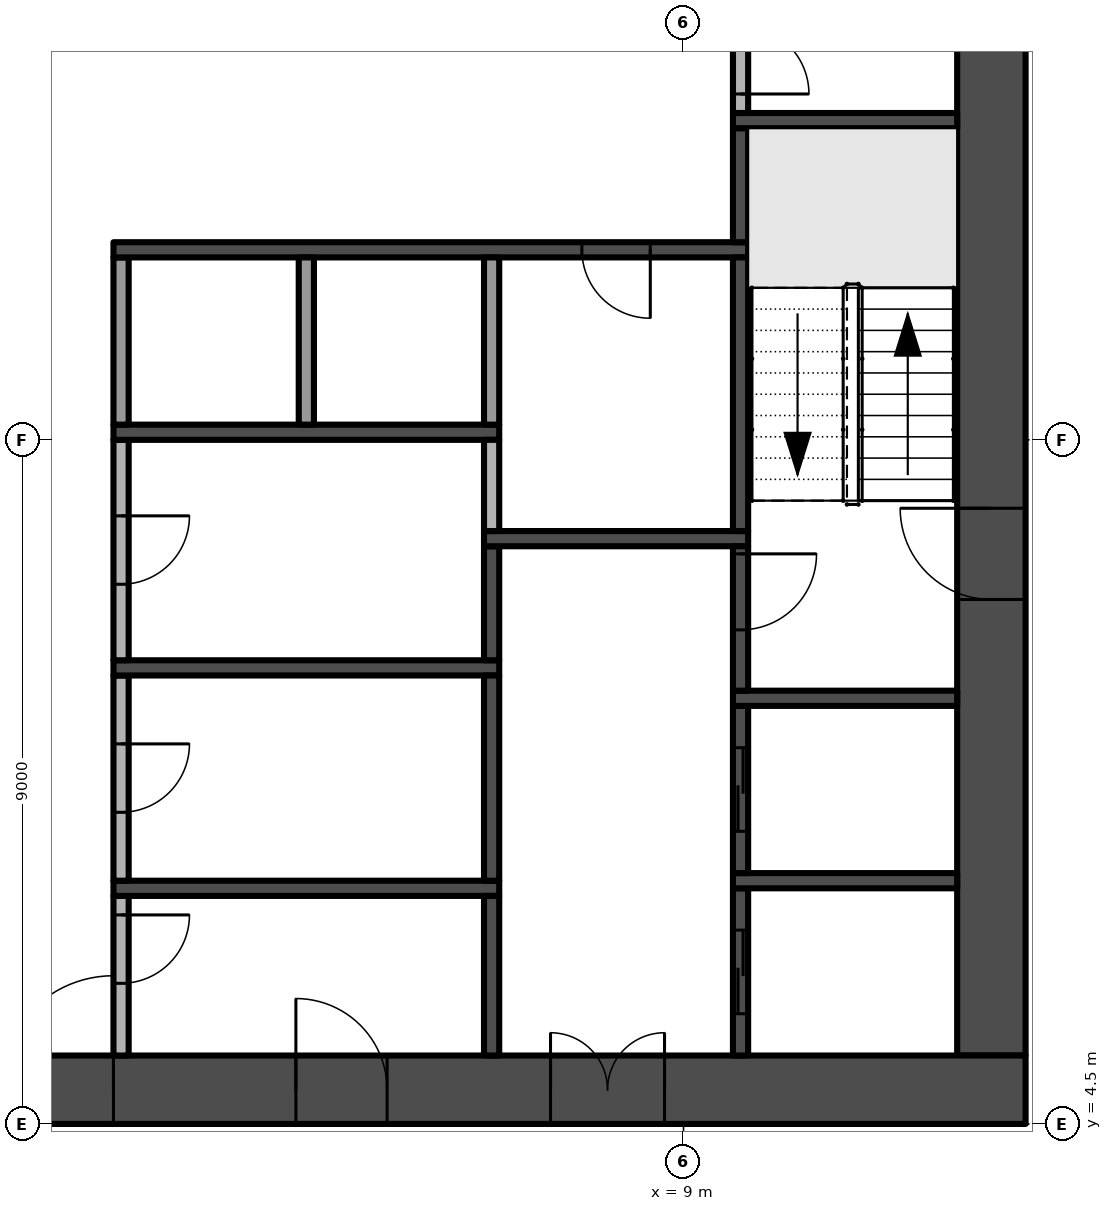
"""IFC4 building model, lengths in metres.
Left out: names, types, materials, properties, quantities, classifications, styles, units other than length and angle.
Written with IfcOpenShell. Run it as: python <this file> out.ifc"""

import sys

from ifc_helpers import new_model, si_unit, direction, frame, frame_2d, origin, place, context, subcontext, project, spatial, rectangle, extrude, element, fill, save


model = new_model("IFC4")
c1 = context("Model", 3, precision=1e-05, world=origin(), true_north=direction((0.0, 1.0)))
c2 = subcontext(c1, "Body", "Model", "MODEL_VIEW")
j1 = project(units=[si_unit("LENGTHUNIT", "METRE"), si_unit("PLANEANGLEUNIT", "RADIAN")], contexts=[c1])
p1 = place(None, origin())
s1 = spatial("IfcSite", under=j1, at=p1, CompositionType="ELEMENT")
p2 = place(p1, origin())
s2 = spatial("IfcBuilding", under=s1, at=p2, CompositionType="ELEMENT")
p3 = place(p2, frame((0.0, 0.0, 45.4)))
s3 = spatial("IfcBuildingStorey", under=s2, at=p3, CompositionType="ELEMENT", Elevation=45.4)
p4 = place(p3, frame((-13.5, 4.95, -0.3), z_axis=(0.0, 0.0, 1.0), x_axis=(1.0, 0.0, 0.0)))
e1 = element("IfcWall", 1, at=p4, inside=s3, PredefinedType="SHEAR", context=c2, shape_type="SweptSolid", body=[
    extrude(rectangle(XDim=27.0, YDim=0.9, at=frame_2d((13.5, 0.0))), origin(), (0.0, 0.0, 1.0), 3.8),
])
p5 = place(p4, frame((12.0, 0.0, 0.3)))
e2 = element("IfcOpeningElement", 2, at=p5, cuts=e1, PredefinedType="OPENING", context=c2, shape_type="SweptSolid", body=[
    extrude(rectangle(XDim=3.0, YDim=2.4, at=frame_2d((1.5, 1.2))), frame((0.0, 0.46, 0.0), z_axis=(0.0, -1.0, 0.0), x_axis=(1.0, 0.0, 0.0)), (0.0, 0.0, 1.0), 0.92),
])
p6 = place(p4, frame((4.9, 0.0, 0.3)))
e3 = element("IfcOpeningElement", 3, at=p6, cuts=e1, PredefinedType="OPENING", context=c2, shape_type="SweptSolid", body=[
    extrude(rectangle(XDim=1.2, YDim=2.2, at=frame_2d((0.6, 1.1))), frame((0.0, 0.46, 0.0), z_axis=(0.0, -1.0, 0.0), x_axis=(1.0, 0.0, 0.0)), (0.0, 0.0, 1.0), 0.92),
])
p7 = place(p4, frame((20.75, 0.0, 0.3)))
e4 = element("IfcOpeningElement", 4, at=p7, cuts=e1, PredefinedType="OPENING", context=c2, shape_type="SweptSolid", body=[
    extrude(rectangle(XDim=1.5, YDim=2.2, at=frame_2d((0.75, 1.1))), frame((0.0, 0.46, 0.0), z_axis=(0.0, -1.0, 0.0), x_axis=(1.0, 0.0, 0.0)), (0.0, 0.0, 1.0), 0.92),
])
p8 = place(p4, frame((17.4, 0.0, 0.3)))
e5 = element("IfcOpeningElement", 5, at=p8, cuts=e1, PredefinedType="OPENING", context=c2, shape_type="SweptSolid", body=[
    extrude(rectangle(XDim=1.2, YDim=2.2, at=frame_2d((0.6, 1.1))), frame((0.0, 0.46, 0.0), z_axis=(0.0, -1.0, 0.0), x_axis=(1.0, 0.0, 0.0)), (0.0, 0.0, 1.0), 0.92),
])
p9 = place(p3, frame((13.05, 5.4, -0.3), z_axis=(0.0, 0.0, 1.0), x_axis=(0.0, 1.0, 0.0)))
e6 = element("IfcWall", 6, at=p9, inside=s3, PredefinedType="SHEAR", context=c2, shape_type="SweptSolid", body=[
    extrude(rectangle(XDim=16.2, YDim=0.9, at=frame_2d((8.1, 0.0))), origin(), (0.0, 0.0, 1.0), 3.8),
])
p10 = place(p9, frame((6.0, 0.0, 0.3)))
e7 = element("IfcOpeningElement", 7, at=p10, cuts=e6, PredefinedType="OPENING", context=c2, shape_type="SweptSolid", body=[
    extrude(rectangle(XDim=1.2, YDim=2.2, at=frame_2d((0.6, 1.1))), frame((0.0, 0.46, 0.0), z_axis=(0.0, -1.0, 0.0), x_axis=(1.0, 0.0, 0.0)), (0.0, 0.0, 1.0), 0.92),
])
p11 = place(p3, frame((1.6, 7.5, 0.0), z_axis=(0.0, 0.0, 1.0), x_axis=(0.0, -1.0, 0.0)))
e8 = element("IfcWall", 8, at=p11, inside=s3, PredefinedType="PARTITIONING", context=c2, shape_type="SweptSolid", body=[
    extrude(rectangle(XDim=2.1, YDim=0.2, at=frame_2d((1.05, 0.0))), origin(), (0.0, 0.0, 1.0), 3.5),
])
p12 = place(p11, frame((0.25, 0.0, 0.0)))
e9 = element("IfcOpeningElement", 9, at=p12, cuts=e8, PredefinedType="OPENING", context=c2, shape_type="SweptSolid", body=[
    extrude(rectangle(XDim=0.9, YDim=2.1, at=frame_2d((0.45, 1.05))), frame((0.0, 0.11, 0.0), z_axis=(0.0, -1.0, 0.0), x_axis=(1.0, 0.0, 0.0)), (0.0, 0.0, 1.0), 0.22),
])
p13 = place(p3, frame((1.5, 7.6, 0.0), z_axis=(0.0, 0.0, 1.0), x_axis=(1.0, 0.0, 0.0)))
e10 = element("IfcWall", 10, at=p13, inside=s3, PredefinedType="SHEAR", context=c2, shape_type="SweptSolid", body=[
    extrude(rectangle(XDim=5.075, YDim=0.2, at=frame_2d((2.538, 0.0))), origin(), (0.0, 0.0, 1.0), 3.5),
])
p14 = place(p3, frame((1.6, 10.4, 0.0), z_axis=(0.0, 0.0, 1.0), x_axis=(0.0, -1.0, 0.0)))
e11 = element("IfcWall", 11, at=p14, inside=s3, PredefinedType="PARTITIONING", context=c2, shape_type="SweptSolid", body=[
    extrude(rectangle(XDim=2.7, YDim=0.2, at=frame_2d((1.35, 0.0))), origin(), (0.0, 0.0, 1.0), 3.5),
])
p15 = place(p14, frame((0.9, 0.0, 0.0)))
e12 = element("IfcOpeningElement", 12, at=p15, cuts=e11, PredefinedType="OPENING", context=c2, shape_type="SweptSolid", body=[
    extrude(rectangle(XDim=0.9, YDim=2.1, at=frame_2d((0.45, 1.05))), frame((0.0, 0.11, 0.0), z_axis=(0.0, -1.0, 0.0), x_axis=(1.0, 0.0, 0.0)), (0.0, 0.0, 1.0), 0.22),
])
p16 = place(p3, frame((1.5, 10.5, 0.0), z_axis=(0.0, 0.0, 1.0), x_axis=(1.0, 0.0, 0.0)))
e13 = element("IfcWall", 13, at=p16, inside=s3, PredefinedType="SHEAR", context=c2, shape_type="SweptSolid", body=[
    extrude(rectangle(XDim=5.075, YDim=0.2, at=frame_2d((2.538, 0.0))), origin(), (0.0, 0.0, 1.0), 3.5),
])
p17 = place(p3, frame((1.6, 13.5, 0.0), z_axis=(0.0, 0.0, 1.0), x_axis=(0.0, -1.0, 0.0)))
e14 = element("IfcWall", 14, at=p17, inside=s3, PredefinedType="PARTITIONING", context=c2, shape_type="SweptSolid", body=[
    extrude(rectangle(XDim=2.9, YDim=0.2, at=frame_2d((1.45, 0.0))), origin(), (0.0, 0.0, 1.0), 3.5),
])
p18 = place(p17, frame((1.0, 0.0, 0.0)))
e15 = element("IfcOpeningElement", 15, at=p18, cuts=e14, PredefinedType="OPENING", context=c2, shape_type="SweptSolid", body=[
    extrude(rectangle(XDim=0.9, YDim=2.1, at=frame_2d((0.45, 1.05))), frame((0.0, 0.11, 0.0), z_axis=(0.0, -1.0, 0.0), x_axis=(1.0, 0.0, 0.0)), (0.0, 0.0, 1.0), 0.22),
])
p19 = place(p3, frame((1.5, 13.6, 0.0), z_axis=(0.0, 0.0, 1.0), x_axis=(1.0, 0.0, 0.0)))
e16 = element("IfcWall", 16, at=p19, inside=s3, PredefinedType="SHEAR", context=c2, shape_type="SweptSolid", body=[
    extrude(rectangle(XDim=5.075, YDim=0.2, at=frame_2d((2.538, 0.0))), origin(), (0.0, 0.0, 1.0), 3.5),
])
p20 = place(p3, frame((1.6, 13.7, 0.0), z_axis=(0.0, 0.0, 1.0), x_axis=(0.0, 1.0, 0.0)))
e17 = element("IfcWall", 17, at=p20, inside=s3, PredefinedType="PARTITIONING", context=c2, shape_type="SweptSolid", body=[
    extrude(rectangle(XDim=2.2, YDim=0.2, at=frame_2d((1.1, 0.0))), origin(), (0.0, 0.0, 1.0), 3.5),
])
p21 = place(p3, frame((9.85, 16.0, 0.0), z_axis=(0.0, 0.0, 1.0), x_axis=(-1.0, 0.0, 0.0)))
e18 = element("IfcWall", 18, at=p21, inside=s3, PredefinedType="SHEAR", context=c2, shape_type="SweptSolid", body=[
    extrude(rectangle(XDim=8.35, YDim=0.2, at=frame_2d((4.175, 0.0))), origin(), (0.0, 0.0, 1.0), 3.5),
])
p22 = place(p21, frame((1.288, 0.0, 0.0)))
e19 = element("IfcOpeningElement", 19, at=p22, cuts=e18, PredefinedType="OPENING", context=c2, shape_type="SweptSolid", body=[
    extrude(rectangle(XDim=0.9, YDim=2.1, at=frame_2d((0.45, 1.05))), frame((0.0, 0.11, 0.0), z_axis=(0.0, -1.0, 0.0), x_axis=(1.0, 0.0, 0.0)), (0.0, 0.0, 1.0), 0.22),
])
p23 = place(p3, frame((4.037, 13.7, 0.0), z_axis=(0.0, 0.0, 1.0), x_axis=(0.0, 1.0, 0.0)))
e20 = element("IfcWall", 20, at=p23, inside=s3, PredefinedType="PARTITIONING", context=c2, shape_type="SweptSolid", body=[
    extrude(rectangle(XDim=2.2, YDim=0.2, at=frame_2d((1.1, 0.0))), origin(), (0.0, 0.0, 1.0), 3.5),
])
p24 = place(p3, frame((6.475, 5.4, 0.0), z_axis=(0.0, 0.0, 1.0), x_axis=(0.0, 1.0, 0.0)))
e21 = element("IfcWall", 21, at=p24, inside=s3, PredefinedType="SHEAR", context=c2, shape_type="SweptSolid", body=[
    extrude(rectangle(XDim=2.1, YDim=0.2, at=frame_2d((1.05, 0.0))), origin(), (0.0, 0.0, 1.0), 3.5),
])
p25 = place(p3, frame((6.475, 7.7, 0.0), z_axis=(0.0, 0.0, 1.0), x_axis=(0.0, 1.0, 0.0)))
e22 = element("IfcWall", 22, at=p25, inside=s3, PredefinedType="SHEAR", context=c2, shape_type="SweptSolid", body=[
    extrude(rectangle(XDim=2.7, YDim=0.2, at=frame_2d((1.35, 0.0))), origin(), (0.0, 0.0, 1.0), 3.5),
])
p26 = place(p3, frame((6.475, 10.6, 0.0), z_axis=(0.0, 0.0, 1.0), x_axis=(0.0, 1.0, 0.0)))
e23 = element("IfcWall", 23, at=p26, inside=s3, PredefinedType="SHEAR", context=c2, shape_type="SweptSolid", body=[
    extrude(rectangle(XDim=1.5, YDim=0.2, at=frame_2d((0.75, 0.0))), origin(), (0.0, 0.0, 1.0), 3.5),
])
p27 = place(p3, frame((6.375, 12.2, 0.0), z_axis=(0.0, 0.0, 1.0), x_axis=(1.0, 0.0, 0.0)))
e24 = element("IfcWall", 24, at=p27, inside=s3, PredefinedType="SHEAR", context=c2, shape_type="SweptSolid", body=[
    extrude(rectangle(XDim=3.475, YDim=0.2, at=frame_2d((1.738, 0.0))), origin(), (0.0, 0.0, 1.0), 3.5),
])
p28 = place(p3, frame((6.475, 12.3, 0.0), z_axis=(0.0, 0.0, 1.0), x_axis=(0.0, 1.0, 0.0)))
e25 = element("IfcWall", 25, at=p28, inside=s3, PredefinedType="PARTITIONING", context=c2, shape_type="SweptSolid", body=[
    extrude(rectangle(XDim=1.2, YDim=0.2, at=frame_2d((0.6, 0.0))), origin(), (0.0, 0.0, 1.0), 3.5),
])
p29 = place(p3, frame((6.475, 13.7, 0.0), z_axis=(0.0, 0.0, 1.0), x_axis=(0.0, 1.0, 0.0)))
e26 = element("IfcWall", 26, at=p29, inside=s3, PredefinedType="PARTITIONING", context=c2, shape_type="SweptSolid", body=[
    extrude(rectangle(XDim=2.2, YDim=0.2, at=frame_2d((1.1, 0.0))), origin(), (0.0, 0.0, 1.0), 3.5),
])
p30 = place(p3, frame((9.75, 5.4, 0.0), z_axis=(0.0, 0.0, 1.0), x_axis=(0.0, 1.0, 0.0)))
e27 = element("IfcWall", 27, at=p30, inside=s3, PredefinedType="SHEAR", context=c2, shape_type="SweptSolid", body=[
    extrude(rectangle(XDim=2.2, YDim=0.2, at=frame_2d((1.1, 0.0))), origin(), (0.0, 0.0, 1.0), 3.5),
])
p31 = place(p30, frame((0.55, 0.0, 0.0)))
e28 = element("IfcOpeningElement", 28, at=p31, cuts=e27, PredefinedType="OPENING", context=c2, shape_type="SweptSolid", body=[
    extrude(rectangle(XDim=1.1, YDim=2.1, at=frame_2d((0.55, 1.05))), frame((0.0, 0.11, 0.0), z_axis=(0.0, -1.0, 0.0), x_axis=(1.0, 0.0, 0.0)), (0.0, 0.0, 1.0), 0.22),
])
p32 = place(p3, frame((9.65, 7.7, 0.0), z_axis=(0.0, 0.0, 1.0), x_axis=(1.0, 0.0, 0.0)))
e29 = element("IfcWall", 29, at=p32, inside=s3, PredefinedType="SHEAR", context=c2, shape_type="SweptSolid", body=[
    extrude(rectangle(XDim=2.95, YDim=0.2, at=frame_2d((1.475, 0.0))), origin(), (0.0, 0.0, 1.0), 3.5),
])
p33 = place(p3, frame((9.75, 7.8, 0.0), z_axis=(0.0, 0.0, 1.0), x_axis=(0.0, 1.0, 0.0)))
e30 = element("IfcWall", 30, at=p33, inside=s3, PredefinedType="SHEAR", context=c2, shape_type="SweptSolid", body=[
    extrude(rectangle(XDim=2.2, YDim=0.2, at=frame_2d((1.1, 0.0))), origin(), (0.0, 0.0, 1.0), 3.5),
])
p34 = place(p33, frame((0.55, 0.0, 0.0)))
e31 = element("IfcOpeningElement", 31, at=p34, cuts=e30, PredefinedType="OPENING", context=c2, shape_type="SweptSolid", body=[
    extrude(rectangle(XDim=1.1, YDim=2.1, at=frame_2d((0.55, 1.05))), frame((0.0, 0.11, 0.0), z_axis=(0.0, -1.0, 0.0), x_axis=(1.0, 0.0, 0.0)), (0.0, 0.0, 1.0), 0.22),
])
p35 = place(p3, frame((9.65, 10.1, 0.0), z_axis=(0.0, 0.0, 1.0), x_axis=(1.0, 0.0, 0.0)))
e32 = element("IfcWall", 32, at=p35, inside=s3, PredefinedType="SHEAR", context=c2, shape_type="SweptSolid", body=[
    extrude(rectangle(XDim=2.95, YDim=0.2, at=frame_2d((1.475, 0.0))), origin(), (0.0, 0.0, 1.0), 3.5),
])
p36 = place(p3, frame((9.75, 12.1, 0.0), z_axis=(0.0, 0.0, 1.0), x_axis=(0.0, -1.0, 0.0)))
e33 = element("IfcWall", 33, at=p36, inside=s3, PredefinedType="SHEAR", context=c2, shape_type="SweptSolid", body=[
    extrude(rectangle(XDim=1.9, YDim=0.2, at=frame_2d((0.95, 0.0))), origin(), (0.0, 0.0, 1.0), 3.5),
])
p37 = place(p36, frame((0.1, 0.0, 0.0)))
e34 = element("IfcOpeningElement", 34, at=p37, cuts=e33, PredefinedType="OPENING", context=c2, shape_type="SweptSolid", body=[
    extrude(rectangle(XDim=1.0, YDim=2.2, at=frame_2d((0.5, 1.1))), frame((0.0, 0.11, 0.0), z_axis=(0.0, -1.0, 0.0), x_axis=(1.0, 0.0, 0.0)), (0.0, 0.0, 1.0), 0.22),
])
p38 = place(p3, frame((9.75, 12.3, 0.0), z_axis=(0.0, 0.0, 1.0), x_axis=(0.0, 1.0, 0.0)))
e35 = element("IfcWall", 35, at=p38, inside=s3, PredefinedType="SHEAR", context=c2, shape_type="SweptSolid", body=[
    extrude(rectangle(XDim=3.6, YDim=0.2, at=frame_2d((1.8, 0.0))), origin(), (0.0, 0.0, 1.0), 3.5),
])
p39 = place(p3, frame((9.75, 16.1, 0.0), z_axis=(0.0, 0.0, 1.0), x_axis=(0.0, 1.0, 0.0)))
e36 = element("IfcWall", 36, at=p39, inside=s3, PredefinedType="SHEAR", context=c2, shape_type="SweptSolid", body=[
    extrude(rectangle(XDim=1.5, YDim=0.2, at=frame_2d((0.75, 0.0))), origin(), (0.0, 0.0, 1.0), 3.5),
])
p40 = place(p3, frame((9.65, 17.7, 0.0), z_axis=(0.0, 0.0, 1.0), x_axis=(1.0, 0.0, 0.0)))
e37 = element("IfcWall", 37, at=p40, inside=s3, PredefinedType="SHEAR", context=c2, shape_type="SweptSolid", body=[
    extrude(rectangle(XDim=2.95, YDim=0.2, at=frame_2d((1.475, 0.0))), origin(), (0.0, 0.0, 1.0), 3.5),
])
p41 = place(p3, frame((9.75, 19.2, 0.0), z_axis=(0.0, 0.0, 1.0), x_axis=(0.0, -1.0, 0.0)))
e38 = element("IfcWall", 38, at=p41, inside=s3, PredefinedType="PARTITIONING", context=c2, shape_type="SweptSolid", body=[
    extrude(rectangle(XDim=1.4, YDim=0.2, at=frame_2d((0.7, 0.0))), origin(), (0.0, 0.0, 1.0), 3.5),
])
p42 = place(p41, frame((0.25, 0.0, 0.0)))
e39 = element("IfcOpeningElement", 39, at=p42, cuts=e38, PredefinedType="OPENING", context=c2, shape_type="SweptSolid", body=[
    extrude(rectangle(XDim=0.9, YDim=2.1, at=frame_2d((0.45, 1.05))), frame((0.0, 0.11, 0.0), z_axis=(0.0, -1.0, 0.0), x_axis=(1.0, 0.0, 0.0)), (0.0, 0.0, 1.0), 0.22),
])
p43 = place(p5, frame((3.0, 0.0, 0.0), z_axis=(0.0, 0.0, 1.0), x_axis=(-1.0, 0.0, 0.0)))
e40 = element("IfcDoor", 40, at=p43, inside=s3, OperationType="DOUBLE_DOOR_SINGLE_SWING", PredefinedType="DOOR", context=c2, shape_type="SweptSolid", body=[
    extrude(rectangle(XDim=3.0, YDim=2.4, at=frame_2d((1.5, 1.2))), frame((0.0, 0.025, 0.0), z_axis=(0.0, -1.0, 0.0), x_axis=(1.0, 0.0, 0.0)), (0.0, 0.0, 1.0), 0.05),
])
fill(e2, e40)
p44 = place(p10, frame((1.2, 0.0, 0.0), z_axis=(0.0, 0.0, 1.0), x_axis=(-1.0, 0.0, 0.0)))
e41 = element("IfcDoor", 41, at=p44, inside=s3, OperationType="SINGLE_SWING_LEFT", PredefinedType="DOOR", context=c2, shape_type="SweptSolid", body=[
    extrude(rectangle(XDim=1.2, YDim=2.2, at=frame_2d((0.6, 1.1))), frame((0.0, 0.025, 0.0), z_axis=(0.0, -1.0, 0.0), x_axis=(1.0, 0.0, 0.0)), (0.0, 0.0, 1.0), 0.05),
])
fill(e7, e41)
p45 = place(p7, frame((1.5, 0.0, 0.0), z_axis=(0.0, 0.0, 1.0), x_axis=(-1.0, 0.0, 0.0)))
e42 = element("IfcDoor", 42, at=p45, inside=s3, OperationType="DOUBLE_DOOR_SINGLE_SWING", PredefinedType="DOOR", context=c2, shape_type="SweptSolid", body=[
    extrude(rectangle(XDim=1.5, YDim=2.2, at=frame_2d((0.75, 1.1))), frame((0.0, 0.025, 0.0), z_axis=(0.0, -1.0, 0.0), x_axis=(1.0, 0.0, 0.0)), (0.0, 0.0, 1.0), 0.05),
])
fill(e4, e42)
p46 = place(p8, frame((1.2, 0.0, 0.0), z_axis=(0.0, 0.0, 1.0), x_axis=(-1.0, 0.0, 0.0)))
e43 = element("IfcDoor", 43, at=p46, inside=s3, OperationType="SINGLE_SWING_RIGHT", PredefinedType="DOOR", context=c2, shape_type="SweptSolid", body=[
    extrude(rectangle(XDim=1.2, YDim=2.2, at=frame_2d((0.6, 1.1))), frame((0.0, 0.025, 0.0), z_axis=(0.0, -1.0, 0.0), x_axis=(1.0, 0.0, 0.0)), (0.0, 0.0, 1.0), 0.05),
])
fill(e5, e43)
p47 = place(p37, origin())
e44 = element("IfcDoor", 44, at=p47, inside=s3, OperationType="SINGLE_SWING_LEFT", PredefinedType="DOOR", context=c2, shape_type="SweptSolid", body=[
    extrude(rectangle(XDim=1.0, YDim=2.2, at=frame_2d((0.5, 1.1))), frame((0.0, 0.025, 0.0), z_axis=(0.0, -1.0, 0.0), x_axis=(1.0, 0.0, 0.0)), (0.0, 0.0, 1.0), 0.05),
])
fill(e34, e44)
p48 = place(p31, origin())
e45 = element("IfcDoor", 45, at=p48, inside=s3, OperationType="SLIDING_TO_RIGHT", PredefinedType="DOOR", context=c2, shape_type="SweptSolid", body=[
    extrude(rectangle(XDim=1.1, YDim=2.1, at=frame_2d((0.55, 1.05))), frame((0.0, 0.025, 0.0), z_axis=(0.0, -1.0, 0.0), x_axis=(1.0, 0.0, 0.0)), (0.0, 0.0, 1.0), 0.05),
])
fill(e28, e45)
p49 = place(p34, origin())
e46 = element("IfcDoor", 46, at=p49, inside=s3, OperationType="SLIDING_TO_RIGHT", PredefinedType="DOOR", context=c2, shape_type="SweptSolid", body=[
    extrude(rectangle(XDim=1.1, YDim=2.1, at=frame_2d((0.55, 1.05))), frame((0.0, 0.025, 0.0), z_axis=(0.0, -1.0, 0.0), x_axis=(1.0, 0.0, 0.0)), (0.0, 0.0, 1.0), 0.05),
])
fill(e31, e46)
p50 = place(p12, origin())
e47 = element("IfcDoor", 47, at=p50, inside=s3, OperationType="SINGLE_SWING_LEFT", PredefinedType="DOOR", context=c2, shape_type="SweptSolid", body=[
    extrude(rectangle(XDim=0.9, YDim=2.1, at=frame_2d((0.45, 1.05))), frame((0.0, 0.025, 0.0), z_axis=(0.0, -1.0, 0.0), x_axis=(1.0, 0.0, 0.0)), (0.0, 0.0, 1.0), 0.05),
])
fill(e9, e47)
p51 = place(p15, origin())
e48 = element("IfcDoor", 48, at=p51, inside=s3, OperationType="SINGLE_SWING_LEFT", PredefinedType="DOOR", context=c2, shape_type="SweptSolid", body=[
    extrude(rectangle(XDim=0.9, YDim=2.1, at=frame_2d((0.45, 1.05))), frame((0.0, 0.025, 0.0), z_axis=(0.0, -1.0, 0.0), x_axis=(1.0, 0.0, 0.0)), (0.0, 0.0, 1.0), 0.05),
])
fill(e12, e48)
p52 = place(p18, origin())
e49 = element("IfcDoor", 49, at=p52, inside=s3, OperationType="SINGLE_SWING_LEFT", PredefinedType="DOOR", context=c2, shape_type="SweptSolid", body=[
    extrude(rectangle(XDim=0.9, YDim=2.1, at=frame_2d((0.45, 1.05))), frame((0.0, 0.025, 0.0), z_axis=(0.0, -1.0, 0.0), x_axis=(1.0, 0.0, 0.0)), (0.0, 0.0, 1.0), 0.05),
])
fill(e15, e49)
p53 = place(p22, origin())
e50 = element("IfcDoor", 50, at=p53, inside=s3, OperationType="SINGLE_SWING_LEFT", PredefinedType="DOOR", context=c2, shape_type="SweptSolid", body=[
    extrude(rectangle(XDim=0.9, YDim=2.1, at=frame_2d((0.45, 1.05))), frame((0.0, 0.025, 0.0), z_axis=(0.0, -1.0, 0.0), x_axis=(1.0, 0.0, 0.0)), (0.0, 0.0, 1.0), 0.05),
])
fill(e19, e50)
p54 = place(p42, origin())
e51 = element("IfcDoor", 51, at=p54, inside=s3, OperationType="SINGLE_SWING_RIGHT", PredefinedType="DOOR", context=c2, shape_type="SweptSolid", body=[
    extrude(rectangle(XDim=0.9, YDim=2.1, at=frame_2d((0.45, 1.05))), frame((0.0, 0.025, 0.0), z_axis=(0.0, -1.0, 0.0), x_axis=(1.0, 0.0, 0.0)), (0.0, 0.0, 1.0), 0.05),
])
fill(e39, e51)
save(model, sys.argv[1])
